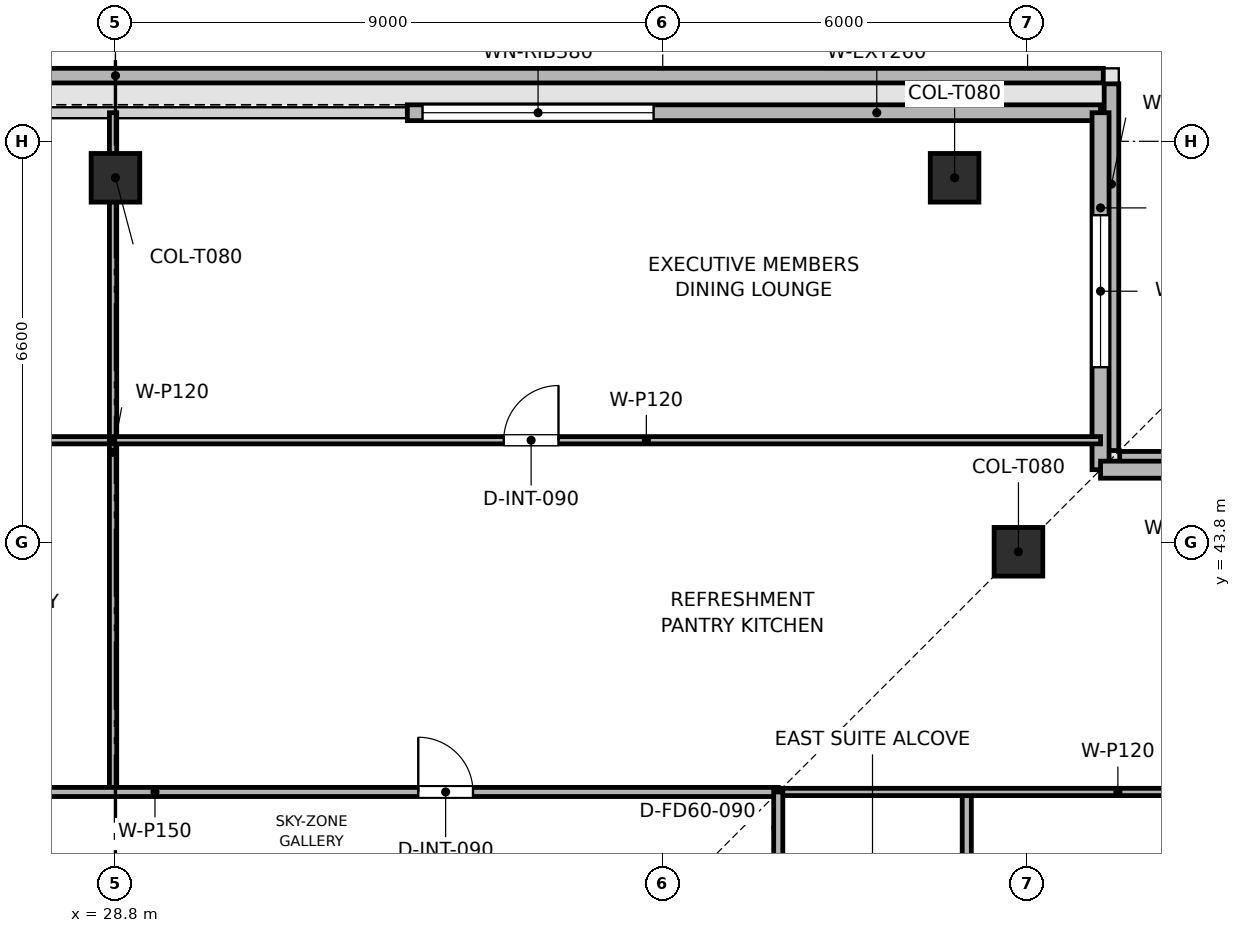
"""IFC4 building model, lengths in metres.
Left out: names, types, materials, properties, quantities, classifications, styles, units other than length and angle.
Written with IfcOpenShell. Run it as: python <this file> out.ifc"""

import sys

from ifc_helpers import new_model, si_unit, direction, frame, frame_2d, origin, origin_2d, place, context, subcontext, project, spatial, rectangle, extrude, element, fill, save


model = new_model("IFC4")
c1 = context("Model", 3, precision=1e-05, world=origin(), true_north=direction((0.0, 1.0)))
c2 = subcontext(c1, "Body", "Model", "MODEL_VIEW")
j1 = project(units=[si_unit("LENGTHUNIT", "METRE"), si_unit("PLANEANGLEUNIT", "RADIAN")], contexts=[c1])
p1 = place(None, origin())
s1 = spatial("IfcSite", under=j1, at=p1, CompositionType="ELEMENT")
p2 = place(p1, origin())
s2 = spatial("IfcBuilding", under=s1, at=p2, CompositionType="ELEMENT")
p3 = place(p2, frame((0.0, 0.0, 333.0)))
s3 = spatial("IfcBuildingStorey", under=s2, at=p3, CompositionType="ELEMENT", Elevation=333.0)
for number, where, z_axis, x_axis in (
    (1, (42.6, 49.8, 0.003), (0.0, 0.0, 1.0), (1.0, 0.0, 0.0)),
    (2, (28.8, 49.8, 0.003), (0.0, 0.0, 1.0), (1.0, 0.0, 0.0)),
    (3, (43.65, 43.65, 0.003), (0.0, 0.0, 1.0), (1.0, 0.0, 0.0)),
):
    element("IfcColumn", number, at=place(p3, frame(where, z_axis=z_axis, x_axis=x_axis)), inside=s3, PredefinedType="COLUMN", context=c2, shape_type="SweptSolid", body=[
        extrude(rectangle(XDim=0.8, YDim=0.8, at=origin_2d()), origin(), (0.0, 0.0, 1.0), 3.504),
    ])
for number, where, z_axis, x_axis in (
    (4, (51.345, 45.18, 0.0), (0.0, 0.0, 1.0), (-1.0, 0.0, 0.0)),
    (5, (45.18, 45.315, 0.0), (0.0, 0.0, 1.0), (0.0, 1.0, 0.0)),
):
    element("IfcWall", number, at=place(p3, frame(where, z_axis=z_axis, x_axis=x_axis)), inside=s3, PredefinedType="PARAPET", context=c2, shape_type="SweptSolid", body=[
        extrude(rectangle(XDim=6.03, YDim=0.24, at=frame_2d((3.015, 0.0))), origin(), (0.0, 0.0, 1.0), 1.2),
    ])
p4 = place(p3, frame((45.045, 51.48, 0.0), z_axis=(0.0, 0.0, 1.0), x_axis=(-1.0, 0.0, 0.0)))
e6 = element("IfcWall", 6, at=p4, inside=s3, PredefinedType="PARAPET", context=c2, shape_type="SweptSolid", body=[
    extrude(rectangle(XDim=32.49, YDim=0.24, at=frame_2d((16.245, 0.0))), origin(), (0.0, 0.0, 1.0), 1.2),
])
p5 = place(p3, frame((33.6, 50.87, 0.0), z_axis=(0.0, 0.0, 1.0), x_axis=(1.0, 0.0, 0.0)))
e7 = element("IfcWall", 7, at=p5, inside=s3, PredefinedType="SOLIDWALL", context=c2, shape_type="SweptSolid", body=[
    extrude(rectangle(XDim=11.4, YDim=0.26, at=frame_2d((5.7, 0.0))), origin(), (0.0, 0.0, 1.0), 3.51),
])
p6 = place(p5, frame((0.25, 0.0, 0.9)))
e8 = element("IfcOpeningElement", 8, at=p6, cuts=e7, PredefinedType="OPENING", context=c2, shape_type="SweptSolid", body=[
    extrude(rectangle(XDim=3.8, YDim=1.9, at=frame_2d((1.9, 0.95))), frame((0.0, 0.14, 0.0), z_axis=(0.0, -1.0, 0.0), x_axis=(1.0, 0.0, 0.0)), (0.0, 0.0, 1.0), 0.28),
])
p7 = place(p3, frame((45.0, 50.87, 0.0), z_axis=(0.0, 0.0, 1.0), x_axis=(0.0, -1.0, 0.0)))
e9 = element("IfcWall", 9, at=p7, inside=s3, PredefinedType="SOLIDWALL", context=c2, shape_type="SweptSolid", body=[
    extrude(rectangle(XDim=5.87, YDim=0.28, at=frame_2d((2.935, 0.0))), origin(), (0.0, 0.0, 1.0), 3.51),
])
p8 = place(p7, frame((1.685, 0.0, 0.9)))
e10 = element("IfcOpeningElement", 10, at=p8, cuts=e9, PredefinedType="OPENING", context=c2, shape_type="SweptSolid", body=[
    extrude(rectangle(XDim=2.5, YDim=1.9, at=frame_2d((1.25, 0.95))), frame((0.0, 0.15, 0.0), z_axis=(0.0, -1.0, 0.0), x_axis=(1.0, 0.0, 0.0)), (0.0, 0.0, 1.0), 0.3),
])
p9 = place(p3, frame((45.0, 45.0, 0.0), z_axis=(0.0, 0.0, 1.0), x_axis=(1.0, 0.0, 0.0)))
e11 = element("IfcWall", 11, at=p9, inside=s3, PredefinedType="SOLIDWALL", context=c2, shape_type="SweptSolid", body=[
    extrude(rectangle(XDim=5.87, YDim=0.28, at=frame_2d((2.935, 0.0))), origin(), (0.0, 0.0, 1.0), 3.51),
])
p10 = place(p9, frame((1.685, 0.0, 0.9)))
e12 = element("IfcOpeningElement", 12, at=p10, cuts=e11, PredefinedType="OPENING", context=c2, shape_type="SweptSolid", body=[
    extrude(rectangle(XDim=2.5, YDim=1.9, at=frame_2d((1.25, 0.95))), frame((0.0, 0.15, 0.0), z_axis=(0.0, -1.0, 0.0), x_axis=(1.0, 0.0, 0.0)), (0.0, 0.0, 1.0), 0.3),
])
p11 = place(p3, frame((20.33, 45.484, 0.0), z_axis=(0.0, 0.0, 1.0), x_axis=(1.0, 0.0, 0.0)))
e13 = element("IfcWall", 13, at=p11, inside=s3, PredefinedType="PARTITIONING", context=c2, shape_type="SweptSolid", body=[
    extrude(rectangle(XDim=8.431, YDim=0.12, at=frame_2d((4.215, 0.0))), origin(), (0.0, 0.0, 1.0), 3.095),
])
p12 = place(p11, frame((1.091, 0.0, 0.0)))
e14 = element("IfcOpeningElement", 14, at=p12, cuts=e13, PredefinedType="OPENING", context=c2, shape_type="SweptSolid", body=[
    extrude(rectangle(XDim=0.9, YDim=2.1, at=frame_2d((0.45, 1.05))), frame((0.0, 0.07, 0.0), z_axis=(0.0, -1.0, 0.0), x_axis=(1.0, 0.0, 0.0)), (0.0, 0.0, 1.0), 0.14),
])
p13 = place(p3, frame((28.761, 39.7, 0.0), z_axis=(0.0, 0.0, 1.0), x_axis=(0.0, 1.0, 0.0)))
e15 = element("IfcWall", 15, at=p13, inside=s3, PredefinedType="PARTITIONING", context=c2, shape_type="SweptSolid", body=[
    extrude(rectangle(XDim=11.17, YDim=0.12, at=frame_2d((5.585, 0.0))), origin(), (0.0, 0.0, 1.0), 2.995),
])
p14 = place(p3, frame((28.761, 45.484, 0.0), z_axis=(0.0, 0.0, 1.0), x_axis=(1.0, 0.0, 0.0)))
e16 = element("IfcWall", 16, at=p14, inside=s3, PredefinedType="PARTITIONING", context=c2, shape_type="SweptSolid", body=[
    extrude(rectangle(XDim=16.239, YDim=0.12, at=frame_2d((8.12, 0.0))), origin(), (0.0, 0.0, 1.0), 3.095),
])
p15 = place(p14, frame((6.425, 0.0, 0.0)))
e17 = element("IfcOpeningElement", 17, at=p15, cuts=e16, PredefinedType="OPENING", context=c2, shape_type="SweptSolid", body=[
    extrude(rectangle(XDim=0.9, YDim=2.1, at=frame_2d((0.45, 1.05))), frame((0.0, 0.07, 0.0), z_axis=(0.0, -1.0, 0.0), x_axis=(1.0, 0.0, 0.0)), (0.0, 0.0, 1.0), 0.14),
])
p16 = place(p3, frame((42.8, 28.0, 0.0), z_axis=(0.0, 0.0, 1.0), x_axis=(0.0, 1.0, 0.0)))
e18 = element("IfcWall", 18, at=p16, inside=s3, PredefinedType="PARTITIONING", context=c2, shape_type="SweptSolid", body=[
    extrude(rectangle(XDim=11.7, YDim=0.15, at=frame_2d((5.85, 0.0))), origin(), (0.0, 0.0, 1.0), 3.095),
])
p17 = place(p16, frame((9.6, 0.0, 0.0)))
e19 = element("IfcOpeningElement", 19, at=p17, cuts=e18, PredefinedType="OPENING", context=c2, shape_type="SweptSolid", body=[
    extrude(rectangle(XDim=0.9, YDim=2.1, at=frame_2d((0.45, 1.05))), frame((0.0, 0.085, 0.0), z_axis=(0.0, -1.0, 0.0), x_axis=(1.0, 0.0, 0.0)), (0.0, 0.0, 1.0), 0.17),
])
p18 = place(p3, frame((39.7, 39.7, 0.0), z_axis=(0.0, 0.0, 1.0), x_axis=(1.0, 0.0, 0.0)))
e20 = element("IfcWall", 20, at=p18, inside=s3, PredefinedType="PARTITIONING", context=c2, shape_type="SweptSolid", body=[
    extrude(rectangle(XDim=11.17, YDim=0.12, at=frame_2d((5.585, 0.0))), origin(), (0.0, 0.0, 1.0), 3.095),
])
p19 = place(p3, frame((17.9, 39.7, 0.0), z_axis=(0.0, 0.0, 1.0), x_axis=(1.0, 0.0, 0.0)))
e21 = element("IfcWall", 21, at=p19, inside=s3, PredefinedType="PARTITIONING", context=c2, shape_type="SweptSolid", body=[
    extrude(rectangle(XDim=21.8, YDim=0.15, at=frame_2d((10.9, 0.0))), origin(), (0.0, 0.0, 1.0), 3.095),
])
p20 = place(p19, frame((0.765, 0.0, 0.0)))
e22 = element("IfcOpeningElement", 22, at=p20, cuts=e21, PredefinedType="OPENING", context=c2, shape_type="SweptSolid", body=[
    extrude(rectangle(XDim=0.9, YDim=2.1, at=frame_2d((0.45, 1.05))), frame((0.0, 0.085, 0.0), z_axis=(0.0, -1.0, 0.0), x_axis=(1.0, 0.0, 0.0)), (0.0, 0.0, 1.0), 0.17),
])
p21 = place(p19, frame((6.195, 0.0, 0.0)))
e23 = element("IfcOpeningElement", 23, at=p21, cuts=e21, PredefinedType="OPENING", context=c2, shape_type="SweptSolid", body=[
    extrude(rectangle(XDim=0.9, YDim=2.1, at=frame_2d((0.45, 1.05))), frame((0.0, 0.085, 0.0), z_axis=(0.0, -1.0, 0.0), x_axis=(1.0, 0.0, 0.0)), (0.0, 0.0, 1.0), 0.17),
])
p22 = place(p19, frame((15.88, 0.0, 0.0)))
e24 = element("IfcOpeningElement", 24, at=p22, cuts=e21, PredefinedType="OPENING", context=c2, shape_type="SweptSolid", body=[
    extrude(rectangle(XDim=0.9, YDim=2.1, at=frame_2d((0.45, 1.05))), frame((0.0, 0.085, 0.0), z_axis=(0.0, -1.0, 0.0), x_axis=(1.0, 0.0, 0.0)), (0.0, 0.0, 1.0), 0.17),
])
p23 = place(p3, frame((39.7, 24.4, 0.0), z_axis=(0.0, 0.0, 1.0), x_axis=(0.0, 1.0, 0.0)))
e25 = element("IfcWall", 25, at=p23, inside=s3, PredefinedType="PARTITIONING", context=c2, shape_type="SweptSolid", body=[
    extrude(rectangle(XDim=15.3, YDim=0.15, at=frame_2d((7.65, 0.0))), origin(), (0.0, 0.0, 1.0), 3.095),
])
p24 = place(p23, frame((1.35, 0.0, 0.0)))
e26 = element("IfcOpeningElement", 26, at=p24, cuts=e25, PredefinedType="OPENING", context=c2, shape_type="SweptSolid", body=[
    extrude(rectangle(XDim=0.9, YDim=2.1, at=frame_2d((0.45, 1.05))), frame((0.0, 0.085, 0.0), z_axis=(0.0, -1.0, 0.0), x_axis=(1.0, 0.0, 0.0)), (0.0, 0.0, 1.0), 0.17),
])
p25 = place(p23, frame((4.55, 0.0, 0.0)))
e27 = element("IfcOpeningElement", 27, at=p25, cuts=e25, PredefinedType="OPENING", context=c2, shape_type="SweptSolid", body=[
    extrude(rectangle(XDim=0.9, YDim=2.1, at=frame_2d((0.45, 1.05))), frame((0.0, 0.085, 0.0), z_axis=(0.0, -1.0, 0.0), x_axis=(1.0, 0.0, 0.0)), (0.0, 0.0, 1.0), 0.17),
])
p26 = place(p23, frame((7.45, 0.0, 0.0)))
e28 = element("IfcOpeningElement", 28, at=p26, cuts=e25, PredefinedType="OPENING", context=c2, shape_type="SweptSolid", body=[
    extrude(rectangle(XDim=0.9, YDim=2.1, at=frame_2d((0.45, 1.05))), frame((0.0, 0.085, 0.0), z_axis=(0.0, -1.0, 0.0), x_axis=(1.0, 0.0, 0.0)), (0.0, 0.0, 1.0), 0.17),
])
p27 = place(p23, frame((10.2, 0.0, 0.0)))
e29 = element("IfcOpeningElement", 29, at=p27, cuts=e25, PredefinedType="OPENING", context=c2, shape_type="SweptSolid", body=[
    extrude(rectangle(XDim=0.95, YDim=2.1, at=frame_2d((0.475, 1.05))), frame((0.0, 0.085, 0.0), z_axis=(0.0, -1.0, 0.0), x_axis=(1.0, 0.0, 0.0)), (0.0, 0.0, 1.0), 0.17),
])
p28 = place(p23, frame((13.2, 0.0, 0.0)))
e30 = element("IfcOpeningElement", 30, at=p28, cuts=e25, PredefinedType="OPENING", context=c2, shape_type="SweptSolid", body=[
    extrude(rectangle(XDim=0.9, YDim=2.1, at=frame_2d((0.45, 1.05))), frame((0.0, 0.085, 0.0), z_axis=(0.0, -1.0, 0.0), x_axis=(1.0, 0.0, 0.0)), (0.0, 0.0, 1.0), 0.17),
])
p29 = place(p6, origin())
e31 = element("IfcWindow", 31, at=p29, inside=s3, PartitioningType="SINGLE_PANEL", PredefinedType="WINDOW", context=c2, shape_type="SweptSolid", body=[
    extrude(rectangle(XDim=3.8, YDim=1.9, at=frame_2d((1.9, 0.95))), frame((0.0, 0.03, 0.0), z_axis=(0.0, -1.0, 0.0), x_axis=(1.0, 0.0, 0.0)), (0.0, 0.0, 1.0), 0.06),
])
fill(e8, e31)
p30 = place(p8, origin())
e32 = element("IfcWindow", 32, at=p30, inside=s3, PartitioningType="SINGLE_PANEL", PredefinedType="WINDOW", context=c2, shape_type="SweptSolid", body=[
    extrude(rectangle(XDim=2.5, YDim=1.9, at=frame_2d((1.25, 0.95))), frame((0.0, 0.03, 0.0), z_axis=(0.0, -1.0, 0.0), x_axis=(1.0, 0.0, 0.0)), (0.0, 0.0, 1.0), 0.06),
])
fill(e10, e32)
p31 = place(p15, origin())
e33 = element("IfcDoor", 33, at=p31, inside=s3, OperationType="SINGLE_SWING_RIGHT", PredefinedType="DOOR", context=c2, shape_type="SweptSolid", body=[
    extrude(rectangle(XDim=0.9, YDim=2.1, at=frame_2d((0.45, 1.05))), frame((0.0, 0.025, 0.0), z_axis=(0.0, -1.0, 0.0), x_axis=(1.0, 0.0, 0.0)), (0.0, 0.0, 1.0), 0.05),
])
fill(e17, e33)
p32 = place(p22, origin())
e34 = element("IfcDoor", 34, at=p32, inside=s3, OperationType="SINGLE_SWING_LEFT", PredefinedType="DOOR", context=c2, shape_type="SweptSolid", body=[
    extrude(rectangle(XDim=0.9, YDim=2.1, at=frame_2d((0.45, 1.05))), frame((0.0, 0.025, 0.0), z_axis=(0.0, -1.0, 0.0), x_axis=(1.0, 0.0, 0.0)), (0.0, 0.0, 1.0), 0.05),
])
fill(e24, e34)
save(model, sys.argv[1])
